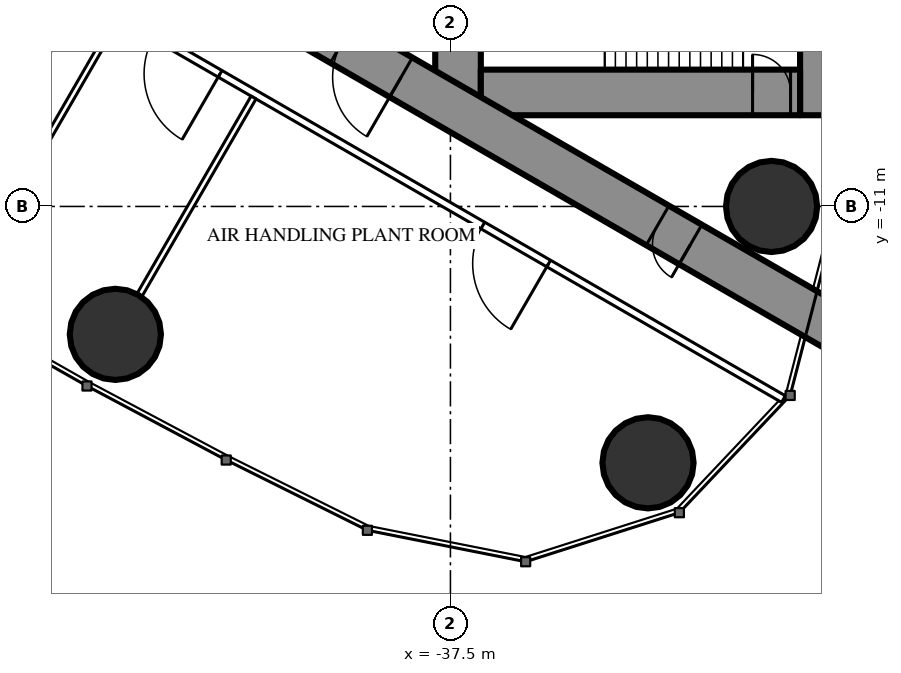
"""IFC4 building model, lengths in metres.
Left out: names, types, materials, properties, quantities, classifications, styles, units other than length and angle.
Written with IfcOpenShell. Run it as: python <this file> out.ifc"""

import sys

from ifc_helpers import new_model, si_unit, direction, frame, frame_2d, origin, origin_2d, place, context, subcontext, project, spatial, rectangle, circle, extrude, element, fill, save


model = new_model("IFC4")
c1 = context("Model", 3, precision=1e-05, world=origin(), true_north=direction((0.0, 1.0)))
c2 = subcontext(c1, "Body", "Model", "MODEL_VIEW")
j1 = project(units=[si_unit("LENGTHUNIT", "METRE"), si_unit("PLANEANGLEUNIT", "RADIAN")], contexts=[c1])
p1 = place(None, origin())
s1 = spatial("IfcSite", under=j1, at=p1, CompositionType="ELEMENT")
p2 = place(p1, origin())
s2 = spatial("IfcBuilding", under=s1, at=p2, CompositionType="ELEMENT")
p3 = place(p2, frame((0.0, 0.0, 263.3)))
s3 = spatial("IfcBuildingStorey", under=s2, at=p3, CompositionType="ELEMENT", Elevation=263.3)
for number, where, z_axis, x_axis in (
    (1, (-32.301, -17.745, 0.0), (0.0, 0.0, 1.0), (1.0, 0.0, 0.0)),
    (2, (-29.05, -11.0, 0.0), (0.0, 0.0, 1.0), (1.0, 0.0, 0.0)),
    (3, (-46.317, -14.365, 0.0), (0.0, 0.0, 1.0), (1.0, 0.0, 0.0)),
):
    element("IfcColumn", number, at=place(p3, frame(where, z_axis=z_axis, x_axis=x_axis)), inside=s3, PredefinedType="COLUMN", context=c2, shape_type="SweptSolid", body=[
        extrude(circle(Radius=1.2, at=origin_2d()), origin(), (0.0, 0.0, 1.0), 5.0),
    ])
p4 = place(p3, frame((-27.9, 8.6, 0.0), z_axis=(0.0, 0.0, 1.0), x_axis=(0.0, -1.0, 0.0)))
e4 = element("IfcWall", 4, at=p4, inside=s3, PredefinedType="SHEAR", context=c2, shape_type="SweptSolid", body=[
    extrude(rectangle(XDim=17.2, YDim=0.8, at=frame_2d((8.6, 0.0))), origin(), (0.0, 0.0, 1.0), 5.0),
])
p5 = place(p4, frame((6.95, 0.0, 0.0)))
e5 = element("IfcOpeningElement", 5, at=p5, cuts=e4, PredefinedType="OPENING", context=c2, shape_type="SweptSolid", body=[
    extrude(rectangle(XDim=0.9, YDim=2.2, at=frame_2d((0.45, 1.1))), frame((0.0, 0.41, 0.0), z_axis=(0.0, -1.0, 0.0), x_axis=(1.0, 0.0, 0.0)), (0.0, 0.0, 1.0), 0.82),
])
p6 = place(p3, frame((-37.3, 8.6, 0.0), z_axis=(0.0, 0.0, 1.0), x_axis=(0.0, -1.0, 0.0)))
e6 = element("IfcWall", 6, at=p6, inside=s3, PredefinedType="SHEAR", context=c2, shape_type="SweptSolid", body=[
    extrude(rectangle(XDim=17.2, YDim=1.2, at=frame_2d((8.6, 0.0))), origin(), (0.0, 0.0, 1.0), 5.0),
])
p7 = place(p6, frame((7.7, 0.0, 0.0)))
e7 = element("IfcOpeningElement", 7, at=p7, cuts=e6, PredefinedType="OPENING", context=c2, shape_type="SweptSolid", body=[
    extrude(rectangle(XDim=1.8, YDim=2.2, at=frame_2d((0.9, 1.1))), frame((0.0, 0.61, 0.0), z_axis=(0.0, -1.0, 0.0), x_axis=(1.0, 0.0, 0.0)), (0.0, 0.0, 1.0), 1.22),
])
p8 = place(p3, frame((-28.3, -8.0, 0.0), z_axis=(0.0, 0.0, 1.0), x_axis=(-1.0, 0.0, 0.0)))
e8 = element("IfcWall", 8, at=p8, inside=s3, PredefinedType="SHEAR", context=c2, shape_type="SweptSolid", body=[
    extrude(rectangle(XDim=8.4, YDim=1.2, at=frame_2d((4.2, 0.0))), origin(), (0.0, 0.0, 1.0), 5.0),
])
p9 = place(p8, frame((0.25, 0.0, 0.0)))
e9 = element("IfcOpeningElement", 9, at=p9, cuts=e8, PredefinedType="OPENING", context=c2, shape_type="SweptSolid", body=[
    extrude(rectangle(XDim=1.0, YDim=2.2, at=frame_2d((0.5, 1.1))), frame((0.0, 0.61, 0.0), z_axis=(0.0, -1.0, 0.0), x_axis=(1.0, 0.0, 0.0)), (0.0, 0.0, 1.0), 1.22),
])
p10 = place(p3, frame((-27.2, -14.3, 0.0), z_axis=(0.0, 0.0, 1.0), x_axis=(-0.866024021859, 0.500002393557, 0.0)))
e10 = element("IfcWall", 10, at=p10, inside=s3, PredefinedType="SHEAR", context=c2, shape_type="SweptSolid", body=[
    extrude(rectangle(XDim=27.907, YDim=1.2, at=frame_2d((13.954, 0.0))), origin(), (0.0, 0.0, 1.0), 5.0),
])
p11 = place(p10, frame((4.6, 0.0, 0.0)))
e11 = element("IfcOpeningElement", 11, at=p11, cuts=e10, PredefinedType="OPENING", context=c2, shape_type="SweptSolid", body=[
    extrude(rectangle(XDim=1.0, YDim=2.2, at=frame_2d((0.5, 1.1))), frame((0.0, 0.61, 0.0), z_axis=(0.0, -1.0, 0.0), x_axis=(1.0, 0.0, 0.0)), (0.0, 0.0, 1.0), 1.22),
])
p12 = place(p10, frame((13.395, 0.0, 0.0)))
e12 = element("IfcOpeningElement", 12, at=p12, cuts=e10, PredefinedType="OPENING", context=c2, shape_type="SweptSolid", body=[
    extrude(rectangle(XDim=1.8, YDim=2.2, at=frame_2d((0.9, 1.1))), frame((0.0, 0.61, 0.0), z_axis=(0.0, -1.0, 0.0), x_axis=(1.0, 0.0, 0.0)), (0.0, 0.0, 1.0), 1.22),
])
p13 = place(p3, frame((-28.737, -16.068, 0.0), z_axis=(0.0, 0.0, 1.0), x_axis=(-0.866026220747, 0.499998584977, 0.0)))
e13 = element("IfcWall", 13, at=p13, inside=s3, PredefinedType="PARTITIONING", context=c2, shape_type="SweptSolid", body=[
    extrude(rectangle(XDim=32.017, YDim=0.2, at=frame_2d((16.008, 0.0))), origin(), (0.0, 0.0, 1.0), 4.75),
])
p14 = place(p13, frame((27.066, 0.0, 0.0)))
e14 = element("IfcOpeningElement", 14, at=p14, cuts=e13, PredefinedType="OPENING", context=c2, shape_type="SweptSolid", body=[
    extrude(rectangle(XDim=2.0, YDim=2.4, at=frame_2d((1.0, 1.2))), frame((0.0, 0.11, 0.0), z_axis=(0.0, -1.0, 0.0), x_axis=(1.0, 0.0, 0.0)), (0.0, 0.0, 1.0), 0.22),
])
p15 = place(p13, frame((21.266, 0.0, 0.0)))
e15 = element("IfcOpeningElement", 15, at=p15, cuts=e13, PredefinedType="OPENING", context=c2, shape_type="SweptSolid", body=[
    extrude(rectangle(XDim=2.0, YDim=2.4, at=frame_2d((1.0, 1.2))), frame((0.0, 0.11, 0.0), z_axis=(0.0, -1.0, 0.0), x_axis=(1.0, 0.0, 0.0)), (0.0, 0.0, 1.0), 0.22),
])
p16 = place(p13, frame((17.117, 0.0, 0.0)))
e16 = element("IfcOpeningElement", 16, at=p16, cuts=e13, PredefinedType="OPENING", context=c2, shape_type="SweptSolid", body=[
    extrude(rectangle(XDim=2.0, YDim=2.4, at=frame_2d((1.0, 1.2))), frame((0.0, 0.11, 0.0), z_axis=(0.0, -1.0, 0.0), x_axis=(1.0, 0.0, 0.0)), (0.0, 0.0, 1.0), 0.22),
])
p17 = place(p13, frame((7.134, 0.0, 0.0)))
e17 = element("IfcOpeningElement", 17, at=p17, cuts=e13, PredefinedType="OPENING", context=c2, shape_type="SweptSolid", body=[
    extrude(rectangle(XDim=2.0, YDim=2.4, at=frame_2d((1.0, 1.2))), frame((0.0, 0.11, 0.0), z_axis=(0.0, -1.0, 0.0), x_axis=(1.0, 0.0, 0.0)), (0.0, 0.0, 1.0), 0.22),
])
p18 = place(p3, frame((-42.68, -8.134, 0.0), z_axis=(0.0, 0.0, 1.0), x_axis=(-0.499984479505, -0.866034364361, 0.0)))
e18 = element("IfcWall", 18, at=p18, inside=s3, PredefinedType="PARTITIONING", context=c2, shape_type="SweptSolid", body=[
    extrude(rectangle(XDim=5.995, YDim=0.15, at=frame_2d((2.998, 0.0))), origin(), (0.0, 0.0, 1.0), 3.85),
])
p19 = place(p3, frame((-46.274, -6.059, 0.0), z_axis=(0.0, 0.0, 1.0), x_axis=(-0.500020471368, -0.866013584312, 0.0)))
e19 = element("IfcWall", 19, at=p19, inside=s3, PredefinedType="PARTITIONING", context=c2, shape_type="SweptSolid", body=[
    extrude(rectangle(XDim=6.028, YDim=0.15, at=frame_2d((3.014, 0.0))), origin(), (0.0, 0.0, 1.0), 3.85),
])
p20 = place(p16, origin())
e20 = element("IfcDoor", 20, at=p20, inside=s3, OperationType="DOUBLE_DOOR_SINGLE_SWING", PredefinedType="DOOR", context=c2, shape_type="SweptSolid", body=[
    extrude(rectangle(XDim=2.0, YDim=2.4, at=frame_2d((1.0, 1.2))), frame((0.0, 0.025, 0.0), z_axis=(0.0, -1.0, 0.0), x_axis=(1.0, 0.0, 0.0)), (0.0, 0.0, 1.0), 0.05),
])
fill(e16, e20)
p21 = place(p17, origin())
e21 = element("IfcDoor", 21, at=p21, inside=s3, OperationType="DOUBLE_DOOR_SINGLE_SWING", PredefinedType="DOOR", context=c2, shape_type="SweptSolid", body=[
    extrude(rectangle(XDim=2.0, YDim=2.4, at=frame_2d((1.0, 1.2))), frame((0.0, 0.025, 0.0), z_axis=(0.0, -1.0, 0.0), x_axis=(1.0, 0.0, 0.0)), (0.0, 0.0, 1.0), 0.05),
])
fill(e17, e21)
p22 = place(p11, origin())
e22 = element("IfcDoor", 22, at=p22, inside=s3, OperationType="SINGLE_SWING_LEFT", PredefinedType="DOOR", context=c2, shape_type="SweptSolid", body=[
    extrude(rectangle(XDim=1.0, YDim=2.2, at=frame_2d((0.5, 1.1))), frame((0.0, 0.025, 0.0), z_axis=(0.0, -1.0, 0.0), x_axis=(1.0, 0.0, 0.0)), (0.0, 0.0, 1.0), 0.05),
])
fill(e11, e22)
p23 = place(p12, origin())
e23 = element("IfcDoor", 23, at=p23, inside=s3, OperationType="DOUBLE_DOOR_SINGLE_SWING", PredefinedType="DOOR", context=c2, shape_type="SweptSolid", body=[
    extrude(rectangle(XDim=1.8, YDim=2.2, at=frame_2d((0.9, 1.1))), frame((0.0, 0.025, 0.0), z_axis=(0.0, -1.0, 0.0), x_axis=(1.0, 0.0, 0.0)), (0.0, 0.0, 1.0), 0.05),
])
fill(e12, e23)
p24 = place(p9, origin())
e24 = element("IfcDoor", 24, at=p24, inside=s3, OperationType="SINGLE_SWING_RIGHT", PredefinedType="DOOR", context=c2, shape_type="SweptSolid", body=[
    extrude(rectangle(XDim=1.0, YDim=2.2, at=frame_2d((0.5, 1.1))), frame((0.0, 0.025, 0.0), z_axis=(0.0, -1.0, 0.0), x_axis=(1.0, 0.0, 0.0)), (0.0, 0.0, 1.0), 0.05),
])
fill(e9, e24)
save(model, sys.argv[1])
